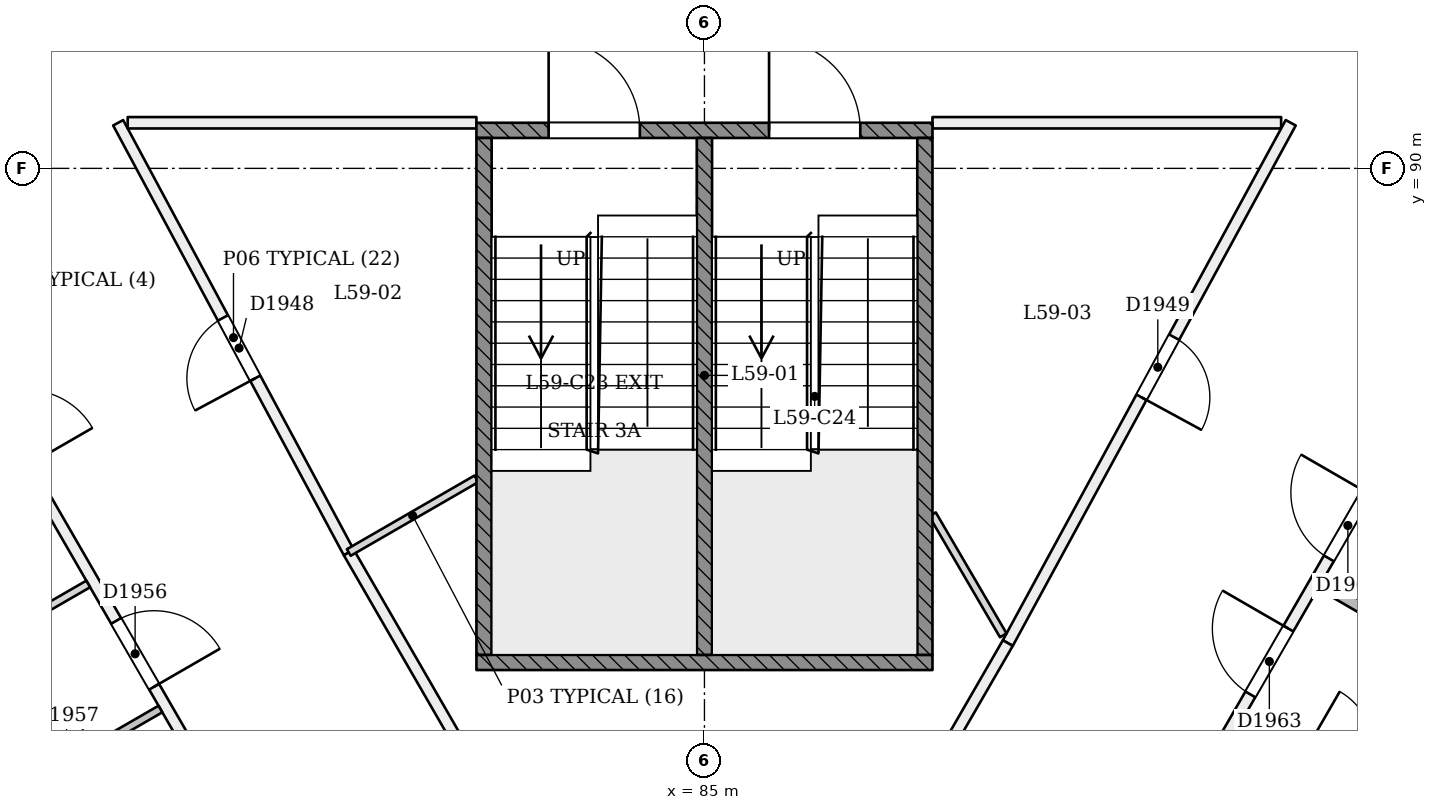
"""IFC4 building model, lengths in metres.
Left out: names, types, materials, properties, quantities, classifications, styles, units other than length and angle.
Written with IfcOpenShell. Run it as: python <this file> out.ifc"""

import sys

from ifc_helpers import new_model, si_unit, direction, frame, frame_2d, origin, place, context, subcontext, project, spatial, rectangle, extrude, element, fill, save


model = new_model("IFC4")
c1 = context("Model", 3, precision=1e-05, world=origin(), true_north=direction((0.0, 1.0)))
c2 = subcontext(c1, "Body", "Model", "MODEL_VIEW")
j1 = project(units=[si_unit("LENGTHUNIT", "METRE"), si_unit("PLANEANGLEUNIT", "RADIAN")], contexts=[c1])
p1 = place(None, origin())
s1 = spatial("IfcSite", under=j1, at=p1, CompositionType="ELEMENT")
p2 = place(p1, origin())
s2 = spatial("IfcBuilding", under=s1, at=p2, CompositionType="ELEMENT")
p3 = place(p2, frame((0.0, 0.0, 230.2)))
s3 = spatial("IfcBuildingStorey", under=s2, at=p3, CompositionType="ELEMENT", Elevation=230.2)
p4 = place(p3, frame((80.321, 84.947, 0.0), z_axis=(0.0, 0.0, 1.0), x_axis=(-0.472885437696, 0.881123920238, 0.0)))
e1 = element("IfcWall", 1, at=p4, inside=s3, PredefinedType="PARTITIONING", context=c2, shape_type="SweptSolid", body=[
    extrude(rectangle(XDim=6.416, YDim=0.15, at=frame_2d((3.208, 0.0))), origin(), (0.0, 0.0, 1.0), 3.2),
])
p5 = place(p4, frame((2.602, 0.0, 0.0)))
e2 = element("IfcOpeningElement", 2, at=p5, cuts=e1, PredefinedType="OPENING", context=c2, shape_type="SweptSolid", body=[
    extrude(rectangle(XDim=0.9, YDim=2.1, at=frame_2d((0.45, 1.05))), frame((0.0, 0.085, 0.0), z_axis=(0.0, -1.0, 0.0), x_axis=(1.0, 0.0, 0.0)), (0.0, 0.0, 1.0), 0.171),
])
p6 = place(p3, frame((77.412, 90.6, 0.0), z_axis=(0.0, 0.0, 1.0), x_axis=(1.0, 0.0, 0.0)))
e3 = element("IfcWall", 3, at=p6, inside=s3, PredefinedType="PARTITIONING", context=c2, shape_type="SweptSolid", body=[
    extrude(rectangle(XDim=4.588, YDim=0.15, at=frame_2d((2.294, 0.0))), origin(), (0.0, 0.0, 1.0), 3.2),
])
p7 = place(p3, frame((88.0, 90.6, 0.0), z_axis=(0.0, 0.0, 1.0), x_axis=(1.0, 0.0, 0.0)))
e4 = element("IfcWall", 4, at=p7, inside=s3, PredefinedType="PARTITIONING", context=c2, shape_type="SweptSolid", body=[
    extrude(rectangle(XDim=4.587, YDim=0.15, at=frame_2d((2.293, 0.0))), origin(), (0.0, 0.0, 1.0), 3.2),
])
p8 = place(p3, frame((92.713, 90.6, 0.0), z_axis=(0.0, 0.0, 1.0), x_axis=(-0.477707883021, -0.87851874112, 0.0)))
e5 = element("IfcWall", 5, at=p8, inside=s3, PredefinedType="PARTITIONING", context=c2, shape_type="SweptSolid", body=[
    extrude(rectangle(XDim=7.791, YDim=0.15, at=frame_2d((3.896, 0.0))), origin(), (0.0, 0.0, 1.0), 3.2),
])
p9 = place(p8, frame((3.211, 0.0, 0.0)))
e6 = element("IfcOpeningElement", 6, at=p9, cuts=e5, PredefinedType="OPENING", context=c2, shape_type="SweptSolid", body=[
    extrude(rectangle(XDim=0.9, YDim=2.1, at=frame_2d((0.45, 1.05))), frame((0.0, 0.085, 0.0), z_axis=(0.0, -1.0, 0.0), x_axis=(1.0, 0.0, 0.0)), (0.0, 0.0, 1.0), 0.171),
])
p10 = place(p3, frame((88.991, 83.755, 0.0), z_axis=(0.0, 0.0, 1.0), x_axis=(-0.500001468015, -0.866024556224, 0.0)))
e7 = element("IfcWall", 7, at=p10, inside=s3, PredefinedType="PARTITIONING", context=c2, shape_type="SweptSolid", body=[
    extrude(rectangle(XDim=7.852, YDim=0.15, at=frame_2d((3.926, 0.0))), origin(), (0.0, 0.0, 1.0), 3.2),
])
p11 = place(p3, frame((85.0, 76.842, 0.0), z_axis=(0.0, 0.0, 1.0), x_axis=(-0.499997217876, 0.866027010039, 0.0)))
e8 = element("IfcWall", 8, at=p11, inside=s3, PredefinedType="PARTITIONING", context=c2, shape_type="SweptSolid", body=[
    extrude(rectangle(XDim=9.358, YDim=0.15, at=frame_2d((4.679, 0.0))), origin(), (0.0, 0.0, 1.0), 3.2),
])
p12 = place(p11, frame((3.766, 0.0, 0.0)))
e9 = element("IfcOpeningElement", 9, at=p12, cuts=e8, PredefinedType="OPENING", context=c2, shape_type="SweptSolid", body=[
    extrude(rectangle(XDim=1.0, YDim=2.1, at=frame_2d((0.5, 1.05))), frame((0.0, 0.085, 0.0), z_axis=(0.0, -1.0, 0.0), x_axis=(1.0, 0.0, 0.0)), (0.0, 0.0, 1.0), 0.171),
])
p13 = place(p3, frame((73.707, 90.2, 0.0), z_axis=(0.0, 0.0, 1.0), x_axis=(0.500000047294, -0.866025376479, 0.0)))
e10 = element("IfcWall", 10, at=p13, inside=s3, PredefinedType="PARTITIONING", context=c2, shape_type="SweptSolid", body=[
    extrude(rectangle(XDim=22.585, YDim=0.15, at=frame_2d((11.293, 0.0))), origin(), (0.0, 0.0, 1.0), 2.8),
])
p14 = place(p13, frame((0.311, 0.0, 0.0)))
e11 = element("IfcOpeningElement", 11, at=p14, cuts=e10, PredefinedType="OPENING", context=c2, shape_type="SweptSolid", body=[
    extrude(rectangle(XDim=1.0, YDim=2.1, at=frame_2d((0.5, 1.05))), frame((0.0, 0.085, 0.0), z_axis=(0.0, -1.0, 0.0), x_axis=(1.0, 0.0, 0.0)), (0.0, 0.0, 1.0), 0.171),
])
p15 = place(p13, frame((3.751, 0.0, 0.0)))
e12 = element("IfcOpeningElement", 12, at=p15, cuts=e10, PredefinedType="OPENING", context=c2, shape_type="SweptSolid", body=[
    extrude(rectangle(XDim=1.0, YDim=2.1, at=frame_2d((0.5, 1.05))), frame((0.0, 0.085, 0.0), z_axis=(0.0, -1.0, 0.0), x_axis=(1.0, 0.0, 0.0)), (0.0, 0.0, 1.0), 0.171),
])
p16 = place(p13, frame((7.105, 0.0, 0.0)))
e13 = element("IfcOpeningElement", 13, at=p16, cuts=e10, PredefinedType="OPENING", context=c2, shape_type="SweptSolid", body=[
    extrude(rectangle(XDim=1.0, YDim=2.1, at=frame_2d((0.5, 1.05))), frame((0.0, 0.085, 0.0), z_axis=(0.0, -1.0, 0.0), x_axis=(1.0, 0.0, 0.0)), (0.0, 0.0, 1.0), 0.171),
])
p17 = place(p13, frame((14.901, 0.0, 0.0)))
e14 = element("IfcOpeningElement", 14, at=p17, cuts=e10, PredefinedType="OPENING", context=c2, shape_type="SweptSolid", body=[
    extrude(rectangle(XDim=1.2, YDim=2.1, at=frame_2d((0.6, 1.05))), frame((0.0, 0.085, 0.0), z_axis=(0.0, -1.0, 0.0), x_axis=(1.0, 0.0, 0.0)), (0.0, 0.0, 1.0), 0.171),
])
p18 = place(p13, frame((20.731, 0.0, 0.0)))
e15 = element("IfcOpeningElement", 15, at=p18, cuts=e10, PredefinedType="OPENING", context=c2, shape_type="SweptSolid", body=[
    extrude(rectangle(XDim=1.2, YDim=2.1, at=frame_2d((0.6, 1.05))), frame((0.0, 0.085, 0.0), z_axis=(0.0, -1.0, 0.0), x_axis=(1.0, 0.0, 0.0)), (0.0, 0.0, 1.0), 0.171),
])
p19 = place(p3, frame((85.065, 70.753, 0.0), z_axis=(0.0, 0.0, 1.0), x_axis=(0.500001339788, 0.866024630256, 0.0)))
e16 = element("IfcWall", 16, at=p19, inside=s3, PredefinedType="PARTITIONING", context=c2, shape_type="SweptSolid", body=[
    extrude(rectangle(XDim=22.456, YDim=0.15, at=frame_2d((11.228, 0.0))), origin(), (0.0, 0.0, 1.0), 2.8),
])
p20 = place(p19, frame((0.734, 0.0, 0.0)))
e17 = element("IfcOpeningElement", 17, at=p20, cuts=e16, PredefinedType="OPENING", context=c2, shape_type="SweptSolid", body=[
    extrude(rectangle(XDim=1.0, YDim=2.1, at=frame_2d((0.5, 1.05))), frame((0.0, 0.085, 0.0), z_axis=(0.0, -1.0, 0.0), x_axis=(1.0, 0.0, 0.0)), (0.0, 0.0, 1.0), 0.171),
])
p21 = place(p19, frame((6.355, 0.0, 0.0)))
e18 = element("IfcOpeningElement", 18, at=p21, cuts=e16, PredefinedType="OPENING", context=c2, shape_type="SweptSolid", body=[
    extrude(rectangle(XDim=1.2, YDim=2.1, at=frame_2d((0.6, 1.05))), frame((0.0, 0.085, 0.0), z_axis=(0.0, -1.0, 0.0), x_axis=(1.0, 0.0, 0.0)), (0.0, 0.0, 1.0), 0.171),
])
p22 = place(p19, frame((14.234, 0.0, 0.0)))
e19 = element("IfcOpeningElement", 19, at=p22, cuts=e16, PredefinedType="OPENING", context=c2, shape_type="SweptSolid", body=[
    extrude(rectangle(XDim=1.0, YDim=2.1, at=frame_2d((0.5, 1.05))), frame((0.0, 0.085, 0.0), z_axis=(0.0, -1.0, 0.0), x_axis=(1.0, 0.0, 0.0)), (0.0, 0.0, 1.0), 0.171),
])
p23 = place(p19, frame((16.3, 0.0, 0.0)))
e20 = element("IfcOpeningElement", 20, at=p23, cuts=e16, PredefinedType="OPENING", context=c2, shape_type="SweptSolid", body=[
    extrude(rectangle(XDim=1.0, YDim=2.1, at=frame_2d((0.5, 1.05))), frame((0.0, 0.085, 0.0), z_axis=(0.0, -1.0, 0.0), x_axis=(1.0, 0.0, 0.0)), (0.0, 0.0, 1.0), 0.171),
])
p24 = place(p19, frame((18.704, 0.0, 0.0)))
e21 = element("IfcOpeningElement", 21, at=p24, cuts=e16, PredefinedType="OPENING", context=c2, shape_type="SweptSolid", body=[
    extrude(rectangle(XDim=1.0, YDim=2.1, at=frame_2d((0.5, 1.05))), frame((0.0, 0.085, 0.0), z_axis=(0.0, -1.0, 0.0), x_axis=(1.0, 0.0, 0.0)), (0.0, 0.0, 1.0), 0.171),
])
p25 = place(p19, frame((21.208, 0.0, 0.0)))
e22 = element("IfcOpeningElement", 22, at=p25, cuts=e16, PredefinedType="OPENING", context=c2, shape_type="SweptSolid", body=[
    extrude(rectangle(XDim=1.0, YDim=2.1, at=frame_2d((0.5, 1.05))), frame((0.0, 0.085, 0.0), z_axis=(0.0, -1.0, 0.0), x_axis=(1.0, 0.0, 0.0)), (0.0, 0.0, 1.0), 0.171),
])
p26 = place(p3, frame((80.321, 84.947, 0.0), z_axis=(0.0, 0.0, 1.0), x_axis=(0.865994746772, 0.500053095744, 0.0)))
e23 = element("IfcWall", 23, at=p26, inside=s3, PredefinedType="PARTITIONING", context=c2, shape_type="SweptSolid", body=[
    extrude(rectangle(XDim=1.939, YDim=0.1, at=frame_2d((0.969, 0.0))), origin(), (0.0, 0.0, 1.0), 3.2),
])
p27 = place(p3, frame((88.0, 85.449, 0.0), z_axis=(0.0, 0.0, 1.0), x_axis=(0.504907502572, -0.863173455249, 0.0)))
e24 = element("IfcWall", 24, at=p27, inside=s3, PredefinedType="PARTITIONING", context=c2, shape_type="SweptSolid", body=[
    extrude(rectangle(XDim=1.845, YDim=0.1, at=frame_2d((0.922, 0.0))), origin(), (0.0, 0.0, 1.0), 3.2),
])
p28 = place(p3, frame((71.397, 81.36, 0.0), z_axis=(0.0, 0.0, 1.0), x_axis=(0.866025401434, 0.500000004071, 0.0)))
e25 = element("IfcWall", 25, at=p28, inside=s3, PredefinedType="PARTITIONING", context=c2, shape_type="SweptSolid", body=[
    extrude(rectangle(XDim=6.345, YDim=0.1, at=frame_2d((3.173, 0.0))), origin(), (0.0, 0.0, 1.0), 2.7),
])
p29 = place(p3, frame((75.31, 81.425, 0.0), z_axis=(0.0, 0.0, 1.0), x_axis=(0.866025730634, 0.499999433879, 0.0)))
e26 = element("IfcWall", 26, at=p29, inside=s3, PredefinedType="PARTITIONING", context=c2, shape_type="SweptSolid", body=[
    extrude(rectangle(XDim=2.925, YDim=0.1, at=frame_2d((1.462, 0.0))), origin(), (0.0, 0.0, 1.0), 3.2),
])
p30 = place(p29, frame((1.05, 0.0, 0.0)))
e27 = element("IfcOpeningElement", 27, at=p30, cuts=e26, PredefinedType="OPENING", context=c2, shape_type="SweptSolid", body=[
    extrude(rectangle(XDim=0.9, YDim=2.1, at=frame_2d((0.45, 1.05))), frame((0.0, 0.061, 0.0), z_axis=(0.0, -1.0, 0.0), x_axis=(1.0, 0.0, 0.0)), (0.0, 0.0, 1.0), 0.121),
])
p31 = place(p3, frame((92.107, 82.801, 0.0), z_axis=(0.0, 0.0, 1.0), x_axis=(0.866048868473, -0.499959355765, 0.0)))
e28 = element("IfcWall", 28, at=p31, inside=s3, PredefinedType="PARTITIONING", context=c2, shape_type="SweptSolid", body=[
    extrude(rectangle(XDim=2.825, YDim=0.1, at=frame_2d((1.413, 0.0))), origin(), (0.0, 0.0, 1.0), 3.2),
])
p32 = place(p31, frame((0.925, 0.0, 0.0)))
e29 = element("IfcOpeningElement", 29, at=p32, cuts=e28, PredefinedType="OPENING", context=c2, shape_type="SweptSolid", body=[
    extrude(rectangle(XDim=0.9, YDim=2.1, at=frame_2d((0.45, 1.05))), frame((0.0, 0.061, 0.0), z_axis=(0.0, -1.0, 0.0), x_axis=(1.0, 0.0, 0.0)), (0.0, 0.0, 1.0), 0.121),
])
p33 = place(p3, frame((98.603, 81.36, 0.0), z_axis=(0.0, 0.0, 1.0), x_axis=(-0.866025401434, 0.500000004071, 0.0)))
e30 = element("IfcWall", 30, at=p33, inside=s3, PredefinedType="PARTITIONING", context=c2, shape_type="SweptSolid", body=[
    extrude(rectangle(XDim=6.345, YDim=0.15, at=frame_2d((3.173, 0.0))), origin(), (0.0, 0.0, 1.0), 2.7),
])
p34 = place(p3, frame((82.0, 90.5, 0.0), z_axis=(0.0, 0.0, 1.0), x_axis=(1.0, 0.0, 0.0)))
e31 = element("IfcWall", 31, at=p34, inside=s3, PredefinedType="SOLIDWALL", context=c2, shape_type="SweptSolid", body=[
    extrude(rectangle(XDim=6.0, YDim=0.2, at=frame_2d((3.0, 0.0))), origin(), (0.0, 0.0, 1.0), 3.2),
])
p35 = place(p34, frame((0.95, 0.0, 0.0)))
e32 = element("IfcOpeningElement", 32, at=p35, cuts=e31, PredefinedType="OPENING", context=c2, shape_type="SweptSolid", body=[
    extrude(rectangle(XDim=1.2, YDim=2.1, at=frame_2d((0.6, 1.05))), frame((0.0, 0.11, 0.0), z_axis=(0.0, -1.0, 0.0), x_axis=(1.0, 0.0, 0.0)), (0.0, 0.0, 1.0), 0.221),
])
p36 = place(p34, frame((3.85, 0.0, 0.0)))
e33 = element("IfcOpeningElement", 33, at=p36, cuts=e31, PredefinedType="OPENING", context=c2, shape_type="SweptSolid", body=[
    extrude(rectangle(XDim=1.2, YDim=2.1, at=frame_2d((0.6, 1.05))), frame((0.0, 0.11, 0.0), z_axis=(0.0, -1.0, 0.0), x_axis=(1.0, 0.0, 0.0)), (0.0, 0.0, 1.0), 0.221),
])
p37 = place(p3, frame((82.0, 83.5, 0.0), z_axis=(0.0, 0.0, 1.0), x_axis=(1.0, 0.0, 0.0)))
e34 = element("IfcWall", 34, at=p37, inside=s3, PredefinedType="SOLIDWALL", context=c2, shape_type="SweptSolid", body=[
    extrude(rectangle(XDim=6.0, YDim=0.2, at=frame_2d((3.0, 0.0))), origin(), (0.0, 0.0, 1.0), 3.2),
])
for number, where, z_axis, x_axis in (
    (35, (82.1, 83.6, 0.0), (0.0, 0.0, 1.0), (0.0, 1.0, 0.0)),
    (36, (87.9, 83.6, 0.0), (0.0, 0.0, 1.0), (0.0, 1.0, 0.0)),
    (37, (85.0, 83.6, 0.0), (0.0, 0.0, 1.0), (0.0, 1.0, 0.0)),
):
    element("IfcWall", number, at=place(p3, frame(where, z_axis=z_axis, x_axis=x_axis)), inside=s3, PredefinedType="SOLIDWALL", context=c2, shape_type="SweptSolid", body=[
        extrude(rectangle(XDim=6.8, YDim=0.2, at=frame_2d((3.4, 0.0))), origin(), (0.0, 0.0, 1.0), 3.2),
    ])
p38 = place(p5, origin())
e38 = element("IfcDoor", 38, at=p38, inside=s3, OperationType="SINGLE_SWING_LEFT", PredefinedType="NOTDEFINED", context=c2, shape_type="SweptSolid", body=[
    extrude(rectangle(XDim=0.9, YDim=2.1, at=frame_2d((0.45, 1.05))), frame((0.0, 0.025, 0.0), z_axis=(0.0, -1.0, 0.0), x_axis=(1.0, 0.0, 0.0)), (0.0, 0.0, 1.0), 0.05),
])
fill(e2, e38)
p39 = place(p9, origin())
e39 = element("IfcDoor", 39, at=p39, inside=s3, OperationType="SINGLE_SWING_RIGHT", PredefinedType="NOTDEFINED", context=c2, shape_type="SweptSolid", body=[
    extrude(rectangle(XDim=0.9, YDim=2.1, at=frame_2d((0.45, 1.05))), frame((0.0, 0.025, 0.0), z_axis=(0.0, -1.0, 0.0), x_axis=(1.0, 0.0, 0.0)), (0.0, 0.0, 1.0), 0.05),
])
fill(e6, e39)
p40 = place(p16, origin())
e40 = element("IfcDoor", 40, at=p40, inside=s3, OperationType="SINGLE_SWING_RIGHT", PredefinedType="NOTDEFINED", context=c2, shape_type="SweptSolid", body=[
    extrude(rectangle(XDim=1.0, YDim=2.1, at=frame_2d((0.5, 1.05))), frame((0.0, 0.025, 0.0), z_axis=(0.0, -1.0, 0.0), x_axis=(1.0, 0.0, 0.0)), (0.0, 0.0, 1.0), 0.05),
])
fill(e13, e40)
p41 = place(p22, origin())
e41 = element("IfcDoor", 41, at=p41, inside=s3, OperationType="SINGLE_SWING_RIGHT", PredefinedType="NOTDEFINED", context=c2, shape_type="SweptSolid", body=[
    extrude(rectangle(XDim=1.0, YDim=2.1, at=frame_2d((0.5, 1.05))), frame((0.0, 0.025, 0.0), z_axis=(0.0, -1.0, 0.0), x_axis=(1.0, 0.0, 0.0)), (0.0, 0.0, 1.0), 0.05),
])
fill(e19, e41)
p42 = place(p23, origin())
e42 = element("IfcDoor", 42, at=p42, inside=s3, OperationType="SINGLE_SWING_RIGHT", PredefinedType="NOTDEFINED", context=c2, shape_type="SweptSolid", body=[
    extrude(rectangle(XDim=1.0, YDim=2.1, at=frame_2d((0.5, 1.05))), frame((0.0, 0.025, 0.0), z_axis=(0.0, -1.0, 0.0), x_axis=(1.0, 0.0, 0.0)), (0.0, 0.0, 1.0), 0.05),
])
fill(e20, e42)
p43 = place(p35, origin())
e43 = element("IfcDoor", 43, at=p43, inside=s3, OperationType="SINGLE_SWING_LEFT", PredefinedType="NOTDEFINED", context=c2, shape_type="SweptSolid", body=[
    extrude(rectangle(XDim=1.2, YDim=2.1, at=frame_2d((0.6, 1.05))), frame((0.0, 0.025, 0.0), z_axis=(0.0, -1.0, 0.0), x_axis=(1.0, 0.0, 0.0)), (0.0, 0.0, 1.0), 0.05),
])
fill(e32, e43)
p44 = place(p36, origin())
e44 = element("IfcDoor", 44, at=p44, inside=s3, OperationType="SINGLE_SWING_LEFT", PredefinedType="NOTDEFINED", context=c2, shape_type="SweptSolid", body=[
    extrude(rectangle(XDim=1.2, YDim=2.1, at=frame_2d((0.6, 1.05))), frame((0.0, 0.025, 0.0), z_axis=(0.0, -1.0, 0.0), x_axis=(1.0, 0.0, 0.0)), (0.0, 0.0, 1.0), 0.05),
])
fill(e33, e44)
save(model, sys.argv[1])
